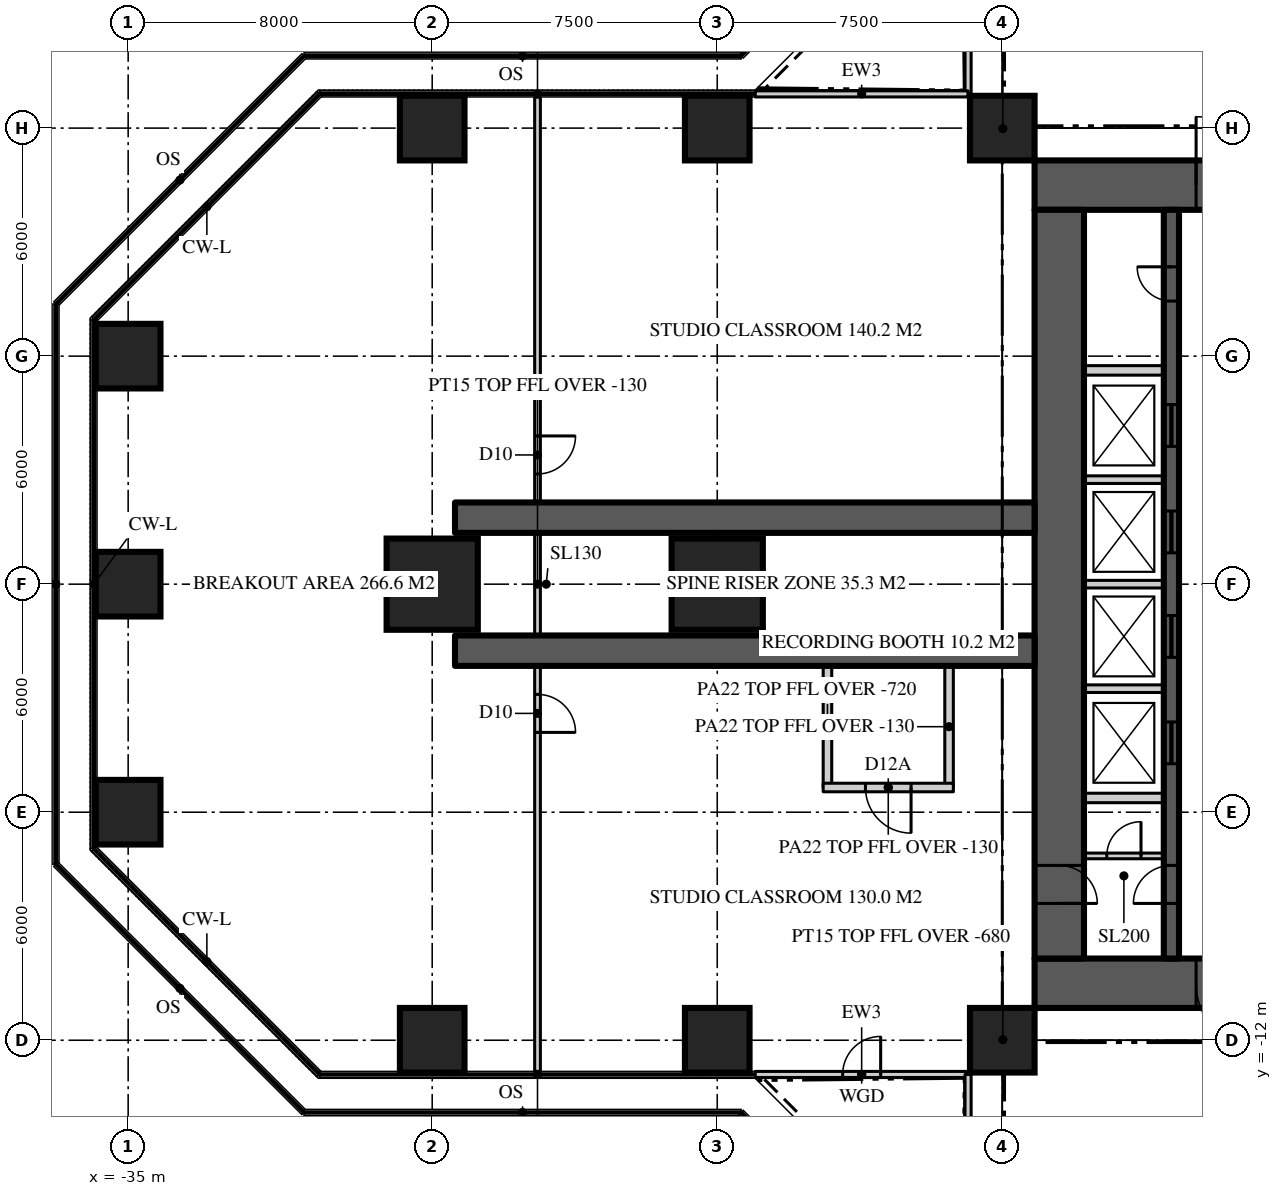
"""IFC4 building model, lengths in metres.
Left out: names, types, materials, properties, quantities, classifications, styles, units other than length and angle.
Written with IfcOpenShell. Run it as: python <this file> out.ifc"""

import sys

from ifc_helpers import new_model, si_unit, direction, frame, frame_2d, origin, origin_2d, place, context, subcontext, project, spatial, rectangle, extrude, element, fill, save


model = new_model("IFC4")
c1 = context("Model", 3, precision=1e-05, world=origin(), true_north=direction((0.0, 1.0)))
c2 = subcontext(c1, "Body", "Model", "MODEL_VIEW")
j1 = project(units=[si_unit("LENGTHUNIT", "METRE"), si_unit("PLANEANGLEUNIT", "RADIAN")], contexts=[c1])
p1 = place(None, origin())
s1 = spatial("IfcSite", under=j1, at=p1, CompositionType="ELEMENT")
p2 = place(p1, origin())
s2 = spatial("IfcBuilding", under=s1, at=p2, CompositionType="ELEMENT")
p3 = place(p2, frame((0.0, 0.0, 102.0)))
s3 = spatial("IfcBuildingStorey", under=s2, at=p3, CompositionType="ELEMENT", Elevation=102.0)
p4 = place(p3, frame((-11.15, 10.5, 0.0), z_axis=(0.0, 0.0, 1.0), x_axis=(1.0, 0.0, 0.0)))
e1 = element("IfcWall", 1, at=p4, inside=s3, PredefinedType="SHEAR", context=c2, shape_type="SweptSolid", body=[
    extrude(rectangle(XDim=22.3, YDim=1.3, at=frame_2d((11.15, 0.0))), origin(), (0.0, 0.0, 1.0), 3.9),
])
p5 = place(p4, frame((4.25, 0.0, 0.0)))
e2 = element("IfcOpeningElement", 2, at=p5, cuts=e1, PredefinedType="OPENING", context=c2, shape_type="SweptSolid", body=[
    extrude(rectangle(XDim=1.8, YDim=2.2, at=frame_2d((0.9, 1.1))), frame((0.0, 0.66, 0.0), z_axis=(0.0, -1.0, 0.0), x_axis=(1.0, 0.0, 0.0)), (0.0, 0.0, 1.0), 1.32),
])
p6 = place(p4, frame((16.25, 0.0, 0.0)))
e3 = element("IfcOpeningElement", 3, at=p6, cuts=e1, PredefinedType="OPENING", context=c2, shape_type="SweptSolid", body=[
    extrude(rectangle(XDim=1.8, YDim=2.2, at=frame_2d((0.9, 1.1))), frame((0.0, 0.66, 0.0), z_axis=(0.0, -1.0, 0.0), x_axis=(1.0, 0.0, 0.0)), (0.0, 0.0, 1.0), 1.32),
])
p7 = place(p3, frame((11.15, -10.5, 0.0), z_axis=(0.0, 0.0, 1.0), x_axis=(-1.0, 0.0, 0.0)))
e4 = element("IfcWall", 4, at=p7, inside=s3, PredefinedType="SHEAR", context=c2, shape_type="SweptSolid", body=[
    extrude(rectangle(XDim=22.3, YDim=1.3, at=frame_2d((11.15, 0.0))), origin(), (0.0, 0.0, 1.0), 3.9),
])
p8 = place(p7, frame((16.25, 0.0, 0.0)))
e5 = element("IfcOpeningElement", 5, at=p8, cuts=e4, PredefinedType="OPENING", context=c2, shape_type="SweptSolid", body=[
    extrude(rectangle(XDim=1.8, YDim=2.2, at=frame_2d((0.9, 1.1))), frame((0.0, 0.66, 0.0), z_axis=(0.0, -1.0, 0.0), x_axis=(1.0, 0.0, 0.0)), (0.0, 0.0, 1.0), 1.32),
])
p9 = place(p7, frame((4.25, 0.0, 0.0)))
e6 = element("IfcOpeningElement", 6, at=p9, cuts=e4, PredefinedType="OPENING", context=c2, shape_type="SweptSolid", body=[
    extrude(rectangle(XDim=1.8, YDim=2.2, at=frame_2d((0.9, 1.1))), frame((0.0, 0.66, 0.0), z_axis=(0.0, -1.0, 0.0), x_axis=(1.0, 0.0, 0.0)), (0.0, 0.0, 1.0), 1.32),
])
p10 = place(p3, frame((-10.5, 9.85, 0.0), z_axis=(0.0, 0.0, 1.0), x_axis=(0.0, -1.0, 0.0)))
e7 = element("IfcWall", 7, at=p10, inside=s3, PredefinedType="SHEAR", context=c2, shape_type="SweptSolid", body=[
    extrude(rectangle(XDim=19.7, YDim=1.3, at=frame_2d((9.85, 0.0))), origin(), (0.0, 0.0, 1.0), 3.9),
])
p11 = place(p10, frame((17.25, 0.0, 0.0)))
e8 = element("IfcOpeningElement", 8, at=p11, cuts=e7, PredefinedType="OPENING", context=c2, shape_type="SweptSolid", body=[
    extrude(rectangle(XDim=1.0, YDim=2.2, at=frame_2d((0.5, 1.1))), frame((0.0, 0.66, 0.0), z_axis=(0.0, -1.0, 0.0), x_axis=(1.0, 0.0, 0.0)), (0.0, 0.0, 1.0), 1.32),
])
for number, where, z_axis, x_axis in (
    (9, (-11.15, 1.75, 0.0), (0.0, 0.0, 1.0), (-1.0, 0.0, 0.0)),
    (10, (-11.15, -1.75, 0.0), (0.0, 0.0, 1.0), (-1.0, 0.0, 0.0)),
):
    element("IfcWall", number, at=place(p3, frame(where, z_axis=z_axis, x_axis=x_axis)), inside=s3, PredefinedType="SHEAR", context=c2, shape_type="SweptSolid", body=[
        extrude(rectangle(XDim=15.25, YDim=0.8, at=frame_2d((7.625, 0.0))), origin(), (0.0, 0.0, 1.0), 3.9),
    ])
for number, where, z_axis, x_axis in (
    (11, (-27.0, -12.0, 0.0), (0.0, 0.0, 1.0), (1.0, 0.0, 0.0)),
    (12, (-19.5, -12.0, 0.0), (0.0, 0.0, 1.0), (1.0, 0.0, 0.0)),
    (13, (-12.0, -12.0, 0.0), (0.0, 0.0, 1.0), (1.0, 0.0, 0.0)),
    (14, (-35.0, -6.0, 0.0), (0.0, 0.0, 1.0), (1.0, 0.0, 0.0)),
    (15, (-35.0, 0.0, 0.0), (0.0, 0.0, 1.0), (1.0, 0.0, 0.0)),
):
    element("IfcColumn", number, at=place(p3, frame(where, z_axis=z_axis, x_axis=x_axis)), inside=s3, PredefinedType="COLUMN", context=c2, shape_type="SweptSolid", body=[
        extrude(rectangle(XDim=1.7, YDim=1.7, at=origin_2d()), origin(), (0.0, 0.0, 1.0), 3.9),
    ])
for number, where, z_axis, x_axis in (
    (16, (-27.0, 0.0, 0.0), (0.0, 0.0, 1.0), (1.0, 0.0, 0.0)),
    (17, (-19.5, 0.0, 0.0), (0.0, 0.0, 1.0), (1.0, 0.0, 0.0)),
):
    element("IfcColumn", number, at=place(p3, frame(where, z_axis=z_axis, x_axis=x_axis)), inside=s3, PredefinedType="COLUMN", context=c2, shape_type="SweptSolid", body=[
        extrude(rectangle(XDim=2.4, YDim=2.4, at=origin_2d()), origin(), (0.0, 0.0, 1.0), 3.9),
    ])
for number, where, z_axis, x_axis in (
    (18, (-35.0, 6.0, 0.0), (0.0, 0.0, 1.0), (1.0, 0.0, 0.0)),
    (19, (-27.0, 12.0, 0.0), (0.0, 0.0, 1.0), (1.0, 0.0, 0.0)),
    (20, (-19.5, 12.0, 0.0), (0.0, 0.0, 1.0), (1.0, 0.0, 0.0)),
    (21, (-12.0, 12.0, 0.0), (0.0, 0.0, 1.0), (1.0, 0.0, 0.0)),
):
    element("IfcColumn", number, at=place(p3, frame(where, z_axis=z_axis, x_axis=x_axis)), inside=s3, PredefinedType="COLUMN", context=c2, shape_type="SweptSolid", body=[
        extrude(rectangle(XDim=1.7, YDim=1.7, at=origin_2d()), origin(), (0.0, 0.0, 1.0), 3.9),
    ])
p12 = place(p3, frame((-12.9, 18.5, 0.0), z_axis=(0.0, 0.0, 1.0), x_axis=(0.0, -1.0, 0.0)))
e22 = element("IfcWall", 22, at=p12, inside=s3, PredefinedType="SOLIDWALL", context=c2, shape_type="SweptSolid", body=[
    extrude(rectangle(XDim=5.6, YDim=0.16, at=frame_2d((2.8, 0.0))), origin(), (0.0, 0.0, 1.0), 3.77),
])
p13 = place(p12, frame((2.3, 0.0, 0.0)))
e23 = element("IfcOpeningElement", 23, at=p13, cuts=e22, PredefinedType="OPENING", context=c2, shape_type="SweptSolid", body=[
    extrude(rectangle(XDim=1.0, YDim=2.2, at=frame_2d((0.5, 1.1))), frame((0.0, 0.09, 0.0), z_axis=(0.0, -1.0, 0.0), x_axis=(1.0, 0.0, 0.0)), (0.0, 0.0, 1.0), 0.18),
])
p14 = place(p3, frame((-12.9, 12.9, 0.0), z_axis=(0.0, 0.0, 1.0), x_axis=(-1.0, 0.0, 0.0)))
e24 = element("IfcWall", 24, at=p14, inside=s3, PredefinedType="SOLIDWALL", context=c2, shape_type="SweptSolid", body=[
    extrude(rectangle(XDim=5.6, YDim=0.16, at=frame_2d((2.8, 0.0))), origin(), (0.0, 0.0, 1.0), 3.77),
])
p15 = place(p3, frame((-18.5, -12.9, 0.0), z_axis=(0.0, 0.0, 1.0), x_axis=(1.0, 0.0, 0.0)))
e25 = element("IfcWall", 25, at=p15, inside=s3, PredefinedType="SOLIDWALL", context=c2, shape_type="SweptSolid", body=[
    extrude(rectangle(XDim=5.6, YDim=0.16, at=frame_2d((2.8, 0.0))), origin(), (0.0, 0.0, 1.0), 3.77),
])
p16 = place(p15, frame((2.3, 0.0, 0.0)))
e26 = element("IfcOpeningElement", 26, at=p16, cuts=e25, PredefinedType="OPENING", context=c2, shape_type="SweptSolid", body=[
    extrude(rectangle(XDim=1.0, YDim=2.2, at=frame_2d((0.5, 1.1))), frame((0.0, 0.09, 0.0), z_axis=(0.0, -1.0, 0.0), x_axis=(1.0, 0.0, 0.0)), (0.0, 0.0, 1.0), 0.18),
])
p17 = place(p3, frame((-12.9, -12.9, 0.0), z_axis=(0.0, 0.0, 1.0), x_axis=(0.0, -1.0, 0.0)))
e27 = element("IfcWall", 27, at=p17, inside=s3, PredefinedType="SOLIDWALL", context=c2, shape_type="SweptSolid", body=[
    extrude(rectangle(XDim=5.6, YDim=0.16, at=frame_2d((2.8, 0.0))), origin(), (0.0, 0.0, 1.0), 3.77),
])
p18 = place(p3, frame((-7.55, -9.85, 0.0), z_axis=(0.0, 0.0, 1.0), x_axis=(0.0, 1.0, 0.0)))
e28 = element("IfcWall", 28, at=p18, inside=s3, PredefinedType="SHEAR", context=c2, shape_type="SweptSolid", body=[
    extrude(rectangle(XDim=19.7, YDim=0.4, at=frame_2d((9.85, 0.0))), origin(), (0.0, 0.0, 1.0), 3.9),
])
p19 = place(p18, frame((1.45, 0.0, 0.0)))
e29 = element("IfcOpeningElement", 29, at=p19, cuts=e28, PredefinedType="OPENING", context=c2, shape_type="SweptSolid", body=[
    extrude(rectangle(XDim=1.0, YDim=2.2, at=frame_2d((0.5, 1.1))), frame((0.0, 0.21, 0.0), z_axis=(0.0, -1.0, 0.0), x_axis=(1.0, 0.0, 0.0)), (0.0, 0.0, 1.0), 0.42),
])
p20 = place(p18, frame((17.3, 0.0, 0.0)))
e30 = element("IfcOpeningElement", 30, at=p20, cuts=e28, PredefinedType="OPENING", context=c2, shape_type="SweptSolid", body=[
    extrude(rectangle(XDim=0.9, YDim=2.1, at=frame_2d((0.45, 1.05))), frame((0.0, 0.21, 0.0), z_axis=(0.0, -1.0, 0.0), x_axis=(1.0, 0.0, 0.0)), (0.0, 0.0, 1.0), 0.42),
])
p21 = place(p18, frame((5.125, 0.0, 0.0)))
e31 = element("IfcOpeningElement", 31, at=p21, cuts=e28, PredefinedType="OPENING", context=c2, shape_type="SweptSolid", body=[
    extrude(rectangle(XDim=1.1, YDim=2.2, at=frame_2d((0.55, 1.1))), frame((0.0, 0.21, 0.0), z_axis=(0.0, -1.0, 0.0), x_axis=(1.0, 0.0, 0.0)), (0.0, 0.0, 1.0), 0.42),
])
p22 = place(p18, frame((7.925, 0.0, 0.0)))
e32 = element("IfcOpeningElement", 32, at=p22, cuts=e28, PredefinedType="OPENING", context=c2, shape_type="SweptSolid", body=[
    extrude(rectangle(XDim=1.1, YDim=2.2, at=frame_2d((0.55, 1.1))), frame((0.0, 0.21, 0.0), z_axis=(0.0, -1.0, 0.0), x_axis=(1.0, 0.0, 0.0)), (0.0, 0.0, 1.0), 0.42),
])
p23 = place(p18, frame((10.675, 0.0, 0.0)))
e33 = element("IfcOpeningElement", 33, at=p23, cuts=e28, PredefinedType="OPENING", context=c2, shape_type="SweptSolid", body=[
    extrude(rectangle(XDim=1.1, YDim=2.2, at=frame_2d((0.55, 1.1))), frame((0.0, 0.21, 0.0), z_axis=(0.0, -1.0, 0.0), x_axis=(1.0, 0.0, 0.0)), (0.0, 0.0, 1.0), 0.42),
])
p24 = place(p18, frame((13.475, 0.0, 0.0)))
e34 = element("IfcOpeningElement", 34, at=p24, cuts=e28, PredefinedType="OPENING", context=c2, shape_type="SweptSolid", body=[
    extrude(rectangle(XDim=1.1, YDim=2.2, at=frame_2d((0.55, 1.1))), frame((0.0, 0.21, 0.0), z_axis=(0.0, -1.0, 0.0), x_axis=(1.0, 0.0, 0.0)), (0.0, 0.0, 1.0), 0.42),
])
for number, where, z_axis, x_axis in (
    (35, (-9.85, 5.625, 0.0), (0.0, 0.0, 1.0), (1.0, 0.0, 0.0)),
    (36, (-9.85, -5.625, 0.0), (0.0, 0.0, 1.0), (1.0, 0.0, 0.0)),
):
    element("IfcWall", number, at=place(p3, frame(where, z_axis=z_axis, x_axis=x_axis)), inside=s3, PredefinedType="SOLIDWALL", context=c2, shape_type="SweptSolid", body=[
        extrude(rectangle(XDim=2.1, YDim=0.25, at=frame_2d((1.05, 0.0))), origin(), (0.0, 0.0, 1.0), 3.7),
    ])
for number, where, z_axis, x_axis in (
    (37, (-9.85, -2.75, 0.0), (0.0, 0.0, 1.0), (1.0, 0.0, 0.0)),
    (38, (-9.85, 0.0, 0.0), (0.0, 0.0, 1.0), (1.0, 0.0, 0.0)),
    (39, (-9.85, 2.75, 0.0), (0.0, 0.0, 1.0), (1.0, 0.0, 0.0)),
):
    element("IfcWall", number, at=place(p3, frame(where, z_axis=z_axis, x_axis=x_axis)), inside=s3, PredefinedType="SOLIDWALL", context=c2, shape_type="SweptSolid", body=[
        extrude(rectangle(XDim=2.1, YDim=0.2, at=frame_2d((1.05, 0.0))), origin(), (0.0, 0.0, 1.0), 3.7),
    ])
p25 = place(p3, frame((-24.229, 12.82, 0.0), z_axis=(0.0, 0.0, 1.0), x_axis=(0.0, -1.0, 0.0)))
e40 = element("IfcWall", 40, at=p25, inside=s3, PredefinedType="PARTITIONING", context=c2, shape_type="SweptSolid", body=[
    extrude(rectangle(XDim=25.64, YDim=0.15, at=frame_2d((12.82, 0.0))), origin(), (0.0, 0.0, 1.0), 3.77),
])
p26 = place(p25, frame((15.72, 0.0, 0.0)))
e41 = element("IfcOpeningElement", 41, at=p26, cuts=e40, PredefinedType="OPENING", context=c2, shape_type="SweptSolid", body=[
    extrude(rectangle(XDim=1.0, YDim=2.2, at=frame_2d((0.5, 1.1))), frame((0.0, 0.085, 0.0), z_axis=(0.0, -1.0, 0.0), x_axis=(1.0, 0.0, 0.0)), (0.0, 0.0, 1.0), 0.17),
])
p27 = place(p25, frame((8.92, 0.0, 0.0)))
e42 = element("IfcOpeningElement", 42, at=p27, cuts=e40, PredefinedType="OPENING", context=c2, shape_type="SweptSolid", body=[
    extrude(rectangle(XDim=1.0, YDim=2.2, at=frame_2d((0.5, 1.1))), frame((0.0, 0.085, 0.0), z_axis=(0.0, -1.0, 0.0), x_axis=(1.0, 0.0, 0.0)), (0.0, 0.0, 1.0), 0.17),
])
p28 = place(p3, frame((-13.4, -2.15, 0.0), z_axis=(0.0, 0.0, 1.0), x_axis=(0.0, -1.0, 0.0)))
e43 = element("IfcWall", 43, at=p28, inside=s3, PredefinedType="PARTITIONING", context=c2, shape_type="SweptSolid", body=[
    extrude(rectangle(XDim=3.2, YDim=0.225, at=frame_2d((1.6, 0.0))), origin(), (0.0, 0.0, 1.0), 3.77),
])
p29 = place(p3, frame((-16.6, -2.15, 0.0), z_axis=(0.0, 0.0, 1.0), x_axis=(0.0, -1.0, 0.0)))
e44 = element("IfcWall", 44, at=p29, inside=s3, PredefinedType="PARTITIONING", context=c2, shape_type="SweptSolid", body=[
    extrude(rectangle(XDim=3.2, YDim=0.225, at=frame_2d((1.6, 0.0))), origin(), (0.0, 0.0, 1.0), 3.18),
])
p30 = place(p3, frame((-13.288, -5.35, 0.0), z_axis=(0.0, 0.0, 1.0), x_axis=(-1.0, 0.0, 0.0)))
e45 = element("IfcWall", 45, at=p30, inside=s3, PredefinedType="PARTITIONING", context=c2, shape_type="SweptSolid", body=[
    extrude(rectangle(XDim=3.425, YDim=0.225, at=frame_2d((1.712, 0.0))), origin(), (0.0, 0.0, 1.0), 3.77),
])
p31 = place(p30, frame((1.113, 0.0, 0.0)))
e46 = element("IfcOpeningElement", 46, at=p31, cuts=e45, PredefinedType="OPENING", context=c2, shape_type="SweptSolid", body=[
    extrude(rectangle(XDim=1.2, YDim=2.2, at=frame_2d((0.6, 1.1))), frame((0.0, 0.123, 0.0), z_axis=(0.0, -1.0, 0.0), x_axis=(1.0, 0.0, 0.0)), (0.0, 0.0, 1.0), 0.245),
])
for number, where, z_axis, x_axis in (
    (47, (-11.15, 11.15, 0.0), (0.0, 0.0, 1.0), (-0.707, 0.707, 0.0)),
    (48, (-11.15, -11.15, 0.0), (0.0, 0.0, 1.0), (-0.707, -0.707, 0.0)),
):
    element("IfcWall", number, at=place(p3, frame(where, z_axis=z_axis, x_axis=x_axis)), inside=s3, PredefinedType="PARTITIONING", context=c2, shape_type="SweptSolid", body=[
        extrude(rectangle(XDim=2.362, YDim=0.15, at=frame_2d((1.181, 0.0))), origin(), (0.0, 0.0, 1.0), 3.22),
    ])
p32 = place(p3, frame((-9.85, -7.15, 0.0), z_axis=(0.0, 0.0, 1.0), x_axis=(1.0, 0.0, 0.0)))
e49 = element("IfcWall", 49, at=p32, inside=s3, PredefinedType="SOLIDWALL", context=c2, shape_type="SweptSolid", body=[
    extrude(rectangle(XDim=2.1, YDim=0.15, at=frame_2d((1.05, 0.0))), origin(), (0.0, 0.0, 1.0), 3.77),
])
p33 = place(p32, frame((0.6, 0.0, 0.0)))
e50 = element("IfcOpeningElement", 50, at=p33, cuts=e49, PredefinedType="OPENING", context=c2, shape_type="SweptSolid", body=[
    extrude(rectangle(XDim=0.9, YDim=2.1, at=frame_2d((0.45, 1.05))), frame((0.0, 0.085, 0.0), z_axis=(0.0, -1.0, 0.0), x_axis=(1.0, 0.0, 0.0)), (0.0, 0.0, 1.0), 0.17),
])
p34 = place(p16, origin())
e51 = element("IfcDoor", 51, at=p34, inside=s3, OperationType="SINGLE_SWING_RIGHT", PredefinedType="DOOR", context=c2, shape_type="SweptSolid", body=[
    extrude(rectangle(XDim=1.0, YDim=2.2, at=frame_2d((0.5, 1.1))), frame((0.0, 0.025, 0.0), z_axis=(0.0, -1.0, 0.0), x_axis=(1.0, 0.0, 0.0)), (0.0, 0.0, 1.0), 0.05),
])
fill(e26, e51)
p35 = place(p5, origin())
e52 = element("IfcDoor", 52, at=p35, inside=s3, OperationType="DOUBLE_DOOR_DOUBLE_SWING", PredefinedType="DOOR", context=c2, shape_type="SweptSolid", body=[
    extrude(rectangle(XDim=1.8, YDim=2.2, at=frame_2d((0.9, 1.1))), frame((0.0, 0.025, 0.0), z_axis=(0.0, -1.0, 0.0), x_axis=(1.0, 0.0, 0.0)), (0.0, 0.0, 1.0), 0.05),
])
fill(e2, e52)
p36 = place(p8, origin())
e53 = element("IfcDoor", 53, at=p36, inside=s3, OperationType="DOUBLE_DOOR_DOUBLE_SWING", PredefinedType="DOOR", context=c2, shape_type="SweptSolid", body=[
    extrude(rectangle(XDim=1.8, YDim=2.2, at=frame_2d((0.9, 1.1))), frame((0.0, 0.025, 0.0), z_axis=(0.0, -1.0, 0.0), x_axis=(1.0, 0.0, 0.0)), (0.0, 0.0, 1.0), 0.05),
])
fill(e5, e53)
p37 = place(p19, origin())
e54 = element("IfcDoor", 54, at=p37, inside=s3, OperationType="SINGLE_SWING_LEFT", PredefinedType="DOOR", context=c2, shape_type="SweptSolid", body=[
    extrude(rectangle(XDim=1.0, YDim=2.2, at=frame_2d((0.5, 1.1))), frame((0.0, 0.025, 0.0), z_axis=(0.0, -1.0, 0.0), x_axis=(1.0, 0.0, 0.0)), (0.0, 0.0, 1.0), 0.05),
])
fill(e29, e54)
p38 = place(p11, origin())
e55 = element("IfcDoor", 55, at=p38, inside=s3, OperationType="SINGLE_SWING_RIGHT", PredefinedType="DOOR", context=c2, shape_type="SweptSolid", body=[
    extrude(rectangle(XDim=1.0, YDim=2.2, at=frame_2d((0.5, 1.1))), frame((0.0, 0.025, 0.0), z_axis=(0.0, -1.0, 0.0), x_axis=(1.0, 0.0, 0.0)), (0.0, 0.0, 1.0), 0.05),
])
fill(e8, e55)
p39 = place(p20, origin())
e56 = element("IfcDoor", 56, at=p39, inside=s3, OperationType="SINGLE_SWING_RIGHT", PredefinedType="DOOR", context=c2, shape_type="SweptSolid", body=[
    extrude(rectangle(XDim=0.9, YDim=2.1, at=frame_2d((0.45, 1.05))), frame((0.0, 0.025, 0.0), z_axis=(0.0, -1.0, 0.0), x_axis=(1.0, 0.0, 0.0)), (0.0, 0.0, 1.0), 0.05),
])
fill(e30, e56)
p40 = place(p21, origin())
e57 = element("IfcDoor", 57, at=p40, inside=s3, OperationType="SLIDING_TO_LEFT", PredefinedType="DOOR", context=c2, shape_type="SweptSolid", body=[
    extrude(rectangle(XDim=1.1, YDim=2.2, at=frame_2d((0.55, 1.1))), frame((0.0, 0.025, 0.0), z_axis=(0.0, -1.0, 0.0), x_axis=(1.0, 0.0, 0.0)), (0.0, 0.0, 1.0), 0.05),
])
fill(e31, e57)
p41 = place(p22, origin())
e58 = element("IfcDoor", 58, at=p41, inside=s3, OperationType="SLIDING_TO_LEFT", PredefinedType="DOOR", context=c2, shape_type="SweptSolid", body=[
    extrude(rectangle(XDim=1.1, YDim=2.2, at=frame_2d((0.55, 1.1))), frame((0.0, 0.025, 0.0), z_axis=(0.0, -1.0, 0.0), x_axis=(1.0, 0.0, 0.0)), (0.0, 0.0, 1.0), 0.05),
])
fill(e32, e58)
p42 = place(p23, origin())
e59 = element("IfcDoor", 59, at=p42, inside=s3, OperationType="SLIDING_TO_LEFT", PredefinedType="DOOR", context=c2, shape_type="SweptSolid", body=[
    extrude(rectangle(XDim=1.1, YDim=2.2, at=frame_2d((0.55, 1.1))), frame((0.0, 0.025, 0.0), z_axis=(0.0, -1.0, 0.0), x_axis=(1.0, 0.0, 0.0)), (0.0, 0.0, 1.0), 0.05),
])
fill(e33, e59)
p43 = place(p24, origin())
e60 = element("IfcDoor", 60, at=p43, inside=s3, OperationType="SLIDING_TO_LEFT", PredefinedType="DOOR", context=c2, shape_type="SweptSolid", body=[
    extrude(rectangle(XDim=1.1, YDim=2.2, at=frame_2d((0.55, 1.1))), frame((0.0, 0.025, 0.0), z_axis=(0.0, -1.0, 0.0), x_axis=(1.0, 0.0, 0.0)), (0.0, 0.0, 1.0), 0.05),
])
fill(e34, e60)
p44 = place(p26, origin())
e61 = element("IfcDoor", 61, at=p44, inside=s3, OperationType="SINGLE_SWING_RIGHT", PredefinedType="DOOR", context=c2, shape_type="SweptSolid", body=[
    extrude(rectangle(XDim=1.0, YDim=2.2, at=frame_2d((0.5, 1.1))), frame((0.0, 0.025, 0.0), z_axis=(0.0, -1.0, 0.0), x_axis=(1.0, 0.0, 0.0)), (0.0, 0.0, 1.0), 0.05),
])
fill(e41, e61)
p45 = place(p27, origin())
e62 = element("IfcDoor", 62, at=p45, inside=s3, OperationType="SINGLE_SWING_LEFT", PredefinedType="DOOR", context=c2, shape_type="SweptSolid", body=[
    extrude(rectangle(XDim=1.0, YDim=2.2, at=frame_2d((0.5, 1.1))), frame((0.0, 0.025, 0.0), z_axis=(0.0, -1.0, 0.0), x_axis=(1.0, 0.0, 0.0)), (0.0, 0.0, 1.0), 0.05),
])
fill(e42, e62)
p46 = place(p31, origin())
e63 = element("IfcDoor", 63, at=p46, inside=s3, OperationType="SINGLE_SWING_LEFT", PredefinedType="DOOR", context=c2, shape_type="SweptSolid", body=[
    extrude(rectangle(XDim=1.2, YDim=2.2, at=frame_2d((0.6, 1.1))), frame((0.0, 0.025, 0.0), z_axis=(0.0, -1.0, 0.0), x_axis=(1.0, 0.0, 0.0)), (0.0, 0.0, 1.0), 0.05),
])
fill(e46, e63)
p47 = place(p33, origin())
e64 = element("IfcDoor", 64, at=p47, inside=s3, OperationType="SINGLE_SWING_RIGHT", PredefinedType="DOOR", context=c2, shape_type="SweptSolid", body=[
    extrude(rectangle(XDim=0.9, YDim=2.1, at=frame_2d((0.45, 1.05))), frame((0.0, 0.025, 0.0), z_axis=(0.0, -1.0, 0.0), x_axis=(1.0, 0.0, 0.0)), (0.0, 0.0, 1.0), 0.05),
])
fill(e50, e64)
save(model, sys.argv[1])
